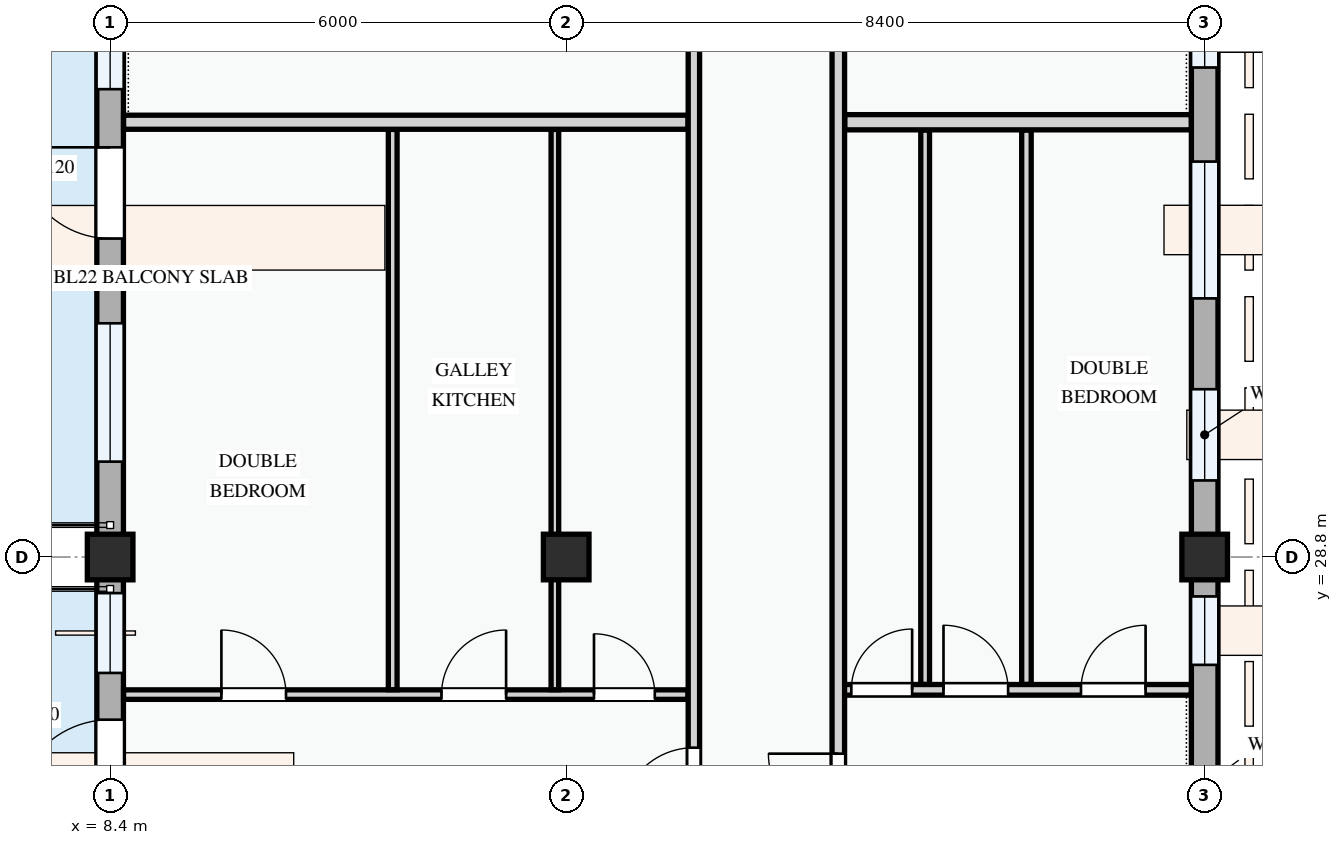
"""IFC4 building model, lengths in metres.
Left out: names, types, materials, properties, quantities, classifications, styles, units other than length and angle.
Written with IfcOpenShell. Run it as: python <this file> out.ifc"""

import sys

from ifc_helpers import new_model, si_unit, direction, frame, frame_2d, origin, origin_2d, place, context, subcontext, project, spatial, rectangle, extrude, element, fill, save


model = new_model("IFC4")
c1 = context("Model", 3, precision=1e-05, world=origin(), true_north=direction((0.0, 1.0)))
c2 = subcontext(c1, "Body", "Model", "MODEL_VIEW")
j1 = project(units=[si_unit("LENGTHUNIT", "METRE"), si_unit("PLANEANGLEUNIT", "RADIAN")], contexts=[c1])
p1 = place(None, origin())
s1 = spatial("IfcSite", under=j1, at=p1, CompositionType="ELEMENT")
p2 = place(p1, origin())
s2 = spatial("IfcBuilding", under=s1, at=p2, CompositionType="ELEMENT")
p3 = place(p2, frame((0.0, 0.0, 8.1)))
s3 = spatial("IfcBuildingStorey", under=s2, at=p3, CompositionType="ELEMENT", Elevation=8.1)
for number, where, z_axis, x_axis in (
    (1, (8.4, 28.8, 0.0), (0.0, 0.0, 1.0), (1.0, 0.0, 0.0)),
    (2, (14.4, 28.8, 0.0), (0.0, 0.0, 1.0), (1.0, 0.0, 0.0)),
    (3, (22.8, 28.8, 0.0), (0.0, 0.0, 1.0), (1.0, 0.0, 0.0)),
):
    element("IfcColumn", number, at=place(p3, frame(where, z_axis=z_axis, x_axis=x_axis)), inside=s3, PredefinedType="COLUMN", context=c2, shape_type="SweptSolid", body=[
        extrude(rectangle(XDim=0.6, YDim=0.6, at=origin_2d()), origin(), (0.0, 0.0, 1.0), 3.3),
    ])
p4 = place(p3, frame((22.8, 22.8, 0.0), z_axis=(0.0, 0.0, 1.0), x_axis=(0.0, 1.0, 0.0)))
e4 = element("IfcWall", 4, at=p4, inside=s3, PredefinedType="STANDARD", context=c2, shape_type="SweptSolid", body=[
    extrude(rectangle(XDim=6.0, YDim=0.35, at=frame_2d((3.0, 0.0))), origin(), (0.0, 0.0, 1.0), 2.575),
])
p5 = place(p4, frame((1.481, 0.0, 0.78)))
e5 = element("IfcOpeningElement", 5, at=p5, cuts=e4, PredefinedType="OPENING", context=c2, shape_type="SweptSolid", body=[
    extrude(rectangle(XDim=1.48, YDim=1.52, at=frame_2d((0.74, 0.76))), frame((0.0, 0.185, 0.0), z_axis=(0.0, -1.0, 0.0), x_axis=(1.0, 0.0, 0.0)), (0.0, 0.0, 1.0), 0.37),
])
p6 = place(p4, frame((4.581, 0.0, 0.78)))
e6 = element("IfcOpeningElement", 6, at=p6, cuts=e4, PredefinedType="OPENING", context=c2, shape_type="SweptSolid", body=[
    extrude(rectangle(XDim=0.9, YDim=1.2, at=frame_2d((0.45, 0.6))), frame((0.0, 0.185, 0.0), z_axis=(0.0, -1.0, 0.0), x_axis=(1.0, 0.0, 0.0)), (0.0, 0.0, 1.0), 0.37),
])
p7 = place(p3, frame((22.8, 28.8, 0.0), z_axis=(0.0, 0.0, 1.0), x_axis=(0.0, 1.0, 0.0)))
e7 = element("IfcWall", 7, at=p7, inside=s3, PredefinedType="STANDARD", context=c2, shape_type="SweptSolid", body=[
    extrude(rectangle(XDim=8.4, YDim=0.35, at=frame_2d((4.2, 0.0))), origin(), (0.0, 0.0, 1.0), 2.425),
])
p8 = place(p7, frame((1.008, 0.0, 0.78)))
e8 = element("IfcOpeningElement", 8, at=p8, cuts=e7, PredefinedType="OPENING", context=c2, shape_type="SweptSolid", body=[
    extrude(rectangle(XDim=1.2, YDim=1.5, at=frame_2d((0.6, 0.75))), frame((0.0, 0.185, 0.0), z_axis=(0.0, -1.0, 0.0), x_axis=(1.0, 0.0, 0.0)), (0.0, 0.0, 1.0), 0.37),
])
p9 = place(p7, frame((3.403, 0.0, 0.78)))
e9 = element("IfcOpeningElement", 9, at=p9, cuts=e7, PredefinedType="OPENING", context=c2, shape_type="SweptSolid", body=[
    extrude(rectangle(XDim=1.8, YDim=1.5, at=frame_2d((0.9, 0.75))), frame((0.0, 0.185, 0.0), z_axis=(0.0, -1.0, 0.0), x_axis=(1.0, 0.0, 0.0)), (0.0, 0.0, 1.0), 0.37),
])
p10 = place(p7, frame((6.44, 0.0, 0.78)))
e10 = element("IfcOpeningElement", 10, at=p10, cuts=e7, PredefinedType="OPENING", context=c2, shape_type="SweptSolid", body=[
    extrude(rectangle(XDim=1.05, YDim=1.2, at=frame_2d((0.525, 0.6))), frame((0.0, 0.185, 0.0), z_axis=(0.0, -1.0, 0.0), x_axis=(1.0, 0.0, 0.0)), (0.0, 0.0, 1.0), 0.37),
])
p11 = place(p3, frame((8.4, 37.2, 0.0), z_axis=(0.0, 0.0, 1.0), x_axis=(0.0, -1.0, 0.0)))
e11 = element("IfcWall", 11, at=p11, inside=s3, PredefinedType="STANDARD", context=c2, shape_type="SweptSolid", body=[
    extrude(rectangle(XDim=8.4, YDim=0.35, at=frame_2d((4.2, 0.0))), origin(), (0.0, 0.0, 1.0), 2.345),
])
p12 = place(p11, frame((3.01, 0.0, 0.0)))
e12 = element("IfcOpeningElement", 12, at=p12, cuts=e11, PredefinedType="OPENING", context=c2, shape_type="SweptSolid", body=[
    extrude(rectangle(XDim=1.2, YDim=2.15, at=frame_2d((0.6, 1.075))), frame((0.0, 0.185, 0.0), z_axis=(0.0, -1.0, 0.0), x_axis=(1.0, 0.0, 0.0)), (0.0, 0.0, 1.0), 0.37),
])
p13 = place(p11, frame((0.625, 0.0, 0.78)))
e13 = element("IfcOpeningElement", 13, at=p13, cuts=e11, PredefinedType="OPENING", context=c2, shape_type="SweptSolid", body=[
    extrude(rectangle(XDim=1.62, YDim=1.38, at=frame_2d((0.81, 0.69))), frame((0.0, 0.185, 0.0), z_axis=(0.0, -1.0, 0.0), x_axis=(1.0, 0.0, 0.0)), (0.0, 0.0, 1.0), 0.37),
])
p14 = place(p11, frame((5.325, 0.0, 0.78)))
e14 = element("IfcOpeningElement", 14, at=p14, cuts=e11, PredefinedType="OPENING", context=c2, shape_type="SweptSolid", body=[
    extrude(rectangle(XDim=1.82, YDim=1.46, at=frame_2d((0.91, 0.73))), frame((0.0, 0.185, 0.0), z_axis=(0.0, -1.0, 0.0), x_axis=(1.0, 0.0, 0.0)), (0.0, 0.0, 1.0), 0.37),
])
p15 = place(p3, frame((8.4, 28.8, 0.0), z_axis=(0.0, 0.0, 1.0), x_axis=(0.0, -1.0, 0.0)))
e15 = element("IfcWall", 15, at=p15, inside=s3, PredefinedType="STANDARD", context=c2, shape_type="SweptSolid", body=[
    extrude(rectangle(XDim=6.0, YDim=0.35, at=frame_2d((3.0, 0.0))), origin(), (0.0, 0.0, 1.0), 2.445),
])
p16 = place(p15, frame((2.14, 0.0, 0.0)))
e16 = element("IfcOpeningElement", 16, at=p16, cuts=e15, PredefinedType="OPENING", context=c2, shape_type="SweptSolid", body=[
    extrude(rectangle(XDim=1.25, YDim=2.2, at=frame_2d((0.625, 1.1))), frame((0.0, 0.185, 0.0), z_axis=(0.0, -1.0, 0.0), x_axis=(1.0, 0.0, 0.0)), (0.0, 0.0, 1.0), 0.37),
])
p17 = place(p15, frame((0.475, 0.0, 0.78)))
e17 = element("IfcOpeningElement", 17, at=p17, cuts=e15, PredefinedType="OPENING", context=c2, shape_type="SweptSolid", body=[
    extrude(rectangle(XDim=1.05, YDim=1.2, at=frame_2d((0.525, 0.6))), frame((0.0, 0.185, 0.0), z_axis=(0.0, -1.0, 0.0), x_axis=(1.0, 0.0, 0.0)), (0.0, 0.0, 1.0), 0.37),
])
p18 = place(p15, frame((3.815, 0.0, 0.78)))
e18 = element("IfcOpeningElement", 18, at=p18, cuts=e15, PredefinedType="OPENING", context=c2, shape_type="SweptSolid", body=[
    extrude(rectangle(XDim=1.62, YDim=1.38, at=frame_2d((0.81, 0.69))), frame((0.0, 0.185, 0.0), z_axis=(0.0, -1.0, 0.0), x_axis=(1.0, 0.0, 0.0)), (0.0, 0.0, 1.0), 0.37),
])
p19 = place(p3, frame((8.577, 26.99, 0.0), z_axis=(0.0, 0.0, 1.0), x_axis=(1.0, 0.0, 0.0)))
e19 = element("IfcWall", 19, at=p19, inside=s3, PredefinedType="PARTITIONING", context=c2, shape_type="SweptSolid", body=[
    extrude(rectangle(XDim=7.426, YDim=0.125, at=frame_2d((3.713, 0.0))), origin(), (0.0, 0.0, 1.0), 3.0),
])
p20 = place(p19, frame((1.287, 0.0, 0.0)))
e20 = element("IfcOpeningElement", 20, at=p20, cuts=e19, PredefinedType="OPENING", context=c2, shape_type="SweptSolid", body=[
    extrude(rectangle(XDim=0.85, YDim=2.1, at=frame_2d((0.425, 1.05))), frame((0.0, 0.073, 0.0), z_axis=(0.0, -1.0, 0.0), x_axis=(1.0, 0.0, 0.0)), (0.0, 0.0, 1.0), 0.145),
])
p21 = place(p19, frame((4.182, 0.0, 0.0)))
e21 = element("IfcOpeningElement", 21, at=p21, cuts=e19, PredefinedType="OPENING", context=c2, shape_type="SweptSolid", body=[
    extrude(rectangle(XDim=0.85, YDim=2.1, at=frame_2d((0.425, 1.05))), frame((0.0, 0.073, 0.0), z_axis=(0.0, -1.0, 0.0), x_axis=(1.0, 0.0, 0.0)), (0.0, 0.0, 1.0), 0.145),
])
p22 = place(p19, frame((6.189, 0.0, 0.0)))
e22 = element("IfcOpeningElement", 22, at=p22, cuts=e19, PredefinedType="OPENING", context=c2, shape_type="SweptSolid", body=[
    extrude(rectangle(XDim=0.8, YDim=2.1, at=frame_2d((0.4, 1.05))), frame((0.0, 0.073, 0.0), z_axis=(0.0, -1.0, 0.0), x_axis=(1.0, 0.0, 0.0)), (0.0, 0.0, 1.0), 0.145),
])
p23 = place(p3, frame((12.118, 27.054, 0.0), z_axis=(0.0, 0.0, 1.0), x_axis=(0.0, 1.0, 0.0)))
e23 = element("IfcWall", 23, at=p23, inside=s3, PredefinedType="PARTITIONING", context=c2, shape_type="SweptSolid", body=[
    extrude(rectangle(XDim=7.371, YDim=0.115, at=frame_2d((3.686, 0.0))), origin(), (0.0, 0.0, 1.0), 3.0),
])
p24 = place(p3, frame((14.251, 27.054, 0.0), z_axis=(0.0, 0.0, 1.0), x_axis=(0.0, 1.0, 0.0)))
e24 = element("IfcWall", 24, at=p24, inside=s3, PredefinedType="PARTITIONING", context=c2, shape_type="SweptSolid", body=[
    extrude(rectangle(XDim=7.371, YDim=0.1, at=frame_2d((3.686, 0.0))), origin(), (0.0, 0.0, 1.0), 2.425),
])
p25 = place(p3, frame((17.98, 27.053, 0.0), z_axis=(0.0, 0.0, 1.0), x_axis=(1.0, 0.0, 0.0)))
e25 = element("IfcWall", 25, at=p25, inside=s3, PredefinedType="PARTITIONING", context=c2, shape_type="SweptSolid", body=[
    extrude(rectangle(XDim=4.643, YDim=0.14, at=frame_2d((2.322, 0.0))), origin(), (0.0, 0.0, 1.0), 3.0),
])
p26 = place(p25, frame((0.171, 0.0, 0.0)))
e26 = element("IfcOpeningElement", 26, at=p26, cuts=e25, PredefinedType="OPENING", context=c2, shape_type="SweptSolid", body=[
    extrude(rectangle(XDim=0.8, YDim=2.1, at=frame_2d((0.4, 1.05))), frame((0.0, 0.08, 0.0), z_axis=(0.0, -1.0, 0.0), x_axis=(1.0, 0.0, 0.0)), (0.0, 0.0, 1.0), 0.16),
])
p27 = place(p25, frame((1.384, 0.0, 0.0)))
e27 = element("IfcOpeningElement", 27, at=p27, cuts=e25, PredefinedType="OPENING", context=c2, shape_type="SweptSolid", body=[
    extrude(rectangle(XDim=0.85, YDim=2.1, at=frame_2d((0.425, 1.05))), frame((0.0, 0.08, 0.0), z_axis=(0.0, -1.0, 0.0), x_axis=(1.0, 0.0, 0.0)), (0.0, 0.0, 1.0), 0.16),
])
p28 = place(p25, frame((3.193, 0.0, 0.0)))
e28 = element("IfcOpeningElement", 28, at=p28, cuts=e25, PredefinedType="OPENING", context=c2, shape_type="SweptSolid", body=[
    extrude(rectangle(XDim=0.85, YDim=2.1, at=frame_2d((0.425, 1.05))), frame((0.0, 0.08, 0.0), z_axis=(0.0, -1.0, 0.0), x_axis=(1.0, 0.0, 0.0)), (0.0, 0.0, 1.0), 0.16),
])
p29 = place(p3, frame((20.455, 27.125, 0.0), z_axis=(0.0, 0.0, 1.0), x_axis=(0.0, 1.0, 0.0)))
e29 = element("IfcWall", 29, at=p29, inside=s3, PredefinedType="PARTITIONING", context=c2, shape_type="SweptSolid", body=[
    extrude(rectangle(XDim=7.293, YDim=0.125, at=frame_2d((3.646, 0.0))), origin(), (0.0, 0.0, 1.0), 3.0),
])
p30 = place(p3, frame((19.122, 27.125, 0.0), z_axis=(0.0, 0.0, 1.0), x_axis=(0.0, 1.0, 0.0)))
e30 = element("IfcWall", 30, at=p30, inside=s3, PredefinedType="PARTITIONING", context=c2, shape_type="SweptSolid", body=[
    extrude(rectangle(XDim=7.293, YDim=0.115, at=frame_2d((3.646, 0.0))), origin(), (0.0, 0.0, 1.0), 3.0),
])
p31 = place(p3, frame((8.577, 34.52, 0.0), z_axis=(0.0, 0.0, 1.0), x_axis=(1.0, 0.0, 0.0)))
e31 = element("IfcWall", 31, at=p31, inside=s3, PredefinedType="PARTITIONING", context=c2, shape_type="SweptSolid", body=[
    extrude(rectangle(XDim=7.426, YDim=0.185, at=frame_2d((3.713, 0.0))), origin(), (0.0, 0.0, 1.0), 3.0),
])
p32 = place(p3, frame((18.064, 34.52, 0.0), z_axis=(0.0, 0.0, 1.0), x_axis=(1.0, 0.0, 0.0)))
e32 = element("IfcWall", 32, at=p32, inside=s3, PredefinedType="PARTITIONING", context=c2, shape_type="SweptSolid", body=[
    extrude(rectangle(XDim=4.559, YDim=0.2, at=frame_2d((2.279, 0.0))), origin(), (0.0, 0.0, 1.0), 3.0),
])
p33 = place(p3, frame((16.08, 22.66, 0.0), z_axis=(0.0, 0.0, 1.0), x_axis=(0.0, 1.0, 0.0)))
e33 = element("IfcWall", 33, at=p33, inside=s3, PredefinedType="PARTITIONING", context=c2, shape_type="SweptSolid", body=[
    extrude(rectangle(XDim=34.763, YDim=0.15, at=frame_2d((17.382, 0.0))), origin(), (0.0, 0.0, 1.0), 3.0),
])
p34 = place(p33, frame((2.672, 0.0, 0.0)))
e34 = element("IfcOpeningElement", 34, at=p34, cuts=e33, PredefinedType="OPENING", context=c2, shape_type="SweptSolid", body=[
    extrude(rectangle(XDim=0.96, YDim=2.12, at=frame_2d((0.48, 1.06))), frame((0.0, 0.085, 0.0), z_axis=(0.0, -1.0, 0.0), x_axis=(1.0, 0.0, 0.0)), (0.0, 0.0, 1.0), 0.17),
])
p35 = place(p33, frame((16.58, 0.0, 0.0)))
e35 = element("IfcOpeningElement", 35, at=p35, cuts=e33, PredefinedType="OPENING", context=c2, shape_type="SweptSolid", body=[
    extrude(rectangle(XDim=0.92, YDim=2.1, at=frame_2d((0.46, 1.05))), frame((0.0, 0.085, 0.0), z_axis=(0.0, -1.0, 0.0), x_axis=(1.0, 0.0, 0.0)), (0.0, 0.0, 1.0), 0.17),
])
p36 = place(p33, frame((24.315, 0.0, 0.0)))
e36 = element("IfcOpeningElement", 36, at=p36, cuts=e33, PredefinedType="OPENING", context=c2, shape_type="SweptSolid", body=[
    extrude(rectangle(XDim=0.92, YDim=2.1, at=frame_2d((0.46, 1.05))), frame((0.0, 0.085, 0.0), z_axis=(0.0, -1.0, 0.0), x_axis=(1.0, 0.0, 0.0)), (0.0, 0.0, 1.0), 0.17),
])
p37 = place(p3, frame((17.98, 22.66, 0.0), z_axis=(0.0, 0.0, 1.0), x_axis=(0.0, 1.0, 0.0)))
e37 = element("IfcWall", 37, at=p37, inside=s3, PredefinedType="PARTITIONING", context=c2, shape_type="SweptSolid", body=[
    extrude(rectangle(XDim=34.763, YDim=0.165, at=frame_2d((17.382, 0.0))), origin(), (0.0, 0.0, 1.0), 3.0),
])
p38 = place(p37, frame((2.633, 0.0, 0.0)))
e38 = element("IfcOpeningElement", 38, at=p38, cuts=e37, PredefinedType="OPENING", context=c2, shape_type="SweptSolid", body=[
    extrude(rectangle(XDim=0.92, YDim=2.1, at=frame_2d((0.46, 1.05))), frame((0.0, 0.093, 0.0), z_axis=(0.0, -1.0, 0.0), x_axis=(1.0, 0.0, 0.0)), (0.0, 0.0, 1.0), 0.185),
])
p39 = place(p37, frame((16.343, 0.0, 0.0)))
e39 = element("IfcOpeningElement", 39, at=p39, cuts=e37, PredefinedType="OPENING", context=c2, shape_type="SweptSolid", body=[
    extrude(rectangle(XDim=0.92, YDim=2.1, at=frame_2d((0.46, 1.05))), frame((0.0, 0.093, 0.0), z_axis=(0.0, -1.0, 0.0), x_axis=(1.0, 0.0, 0.0)), (0.0, 0.0, 1.0), 0.185),
])
p40 = place(p37, frame((24.313, 0.0, 0.0)))
e40 = element("IfcOpeningElement", 40, at=p40, cuts=e37, PredefinedType="OPENING", context=c2, shape_type="SweptSolid", body=[
    extrude(rectangle(XDim=0.96, YDim=2.12, at=frame_2d((0.48, 1.06))), frame((0.0, 0.093, 0.0), z_axis=(0.0, -1.0, 0.0), x_axis=(1.0, 0.0, 0.0)), (0.0, 0.0, 1.0), 0.185),
])
p41 = place(p6, origin())
e41 = element("IfcWindow", 41, at=p41, inside=s3, PartitioningType="SINGLE_PANEL", PredefinedType="WINDOW", context=c2, shape_type="SweptSolid", body=[
    extrude(rectangle(XDim=0.9, YDim=1.2, at=frame_2d((0.45, 0.6))), frame((0.0, 0.03, 0.0), z_axis=(0.0, -1.0, 0.0), x_axis=(1.0, 0.0, 0.0)), (0.0, 0.0, 1.0), 0.06),
])
fill(e6, e41)
p42 = place(p8, origin())
e42 = element("IfcWindow", 42, at=p42, inside=s3, PartitioningType="SINGLE_PANEL", PredefinedType="WINDOW", context=c2, shape_type="SweptSolid", body=[
    extrude(rectangle(XDim=1.2, YDim=1.5, at=frame_2d((0.6, 0.75))), frame((0.0, 0.03, 0.0), z_axis=(0.0, -1.0, 0.0), x_axis=(1.0, 0.0, 0.0)), (0.0, 0.0, 1.0), 0.06),
])
fill(e8, e42)
p43 = place(p9, origin())
e43 = element("IfcWindow", 43, at=p43, inside=s3, PartitioningType="DOUBLE_PANEL_VERTICAL", PredefinedType="WINDOW", context=c2, shape_type="SweptSolid", body=[
    extrude(rectangle(XDim=1.8, YDim=1.5, at=frame_2d((0.9, 0.75))), frame((0.0, 0.03, 0.0), z_axis=(0.0, -1.0, 0.0), x_axis=(1.0, 0.0, 0.0)), (0.0, 0.0, 1.0), 0.06),
])
fill(e9, e43)
p44 = place(p10, origin())
e44 = element("IfcWindow", 44, at=p44, inside=s3, PartitioningType="SINGLE_PANEL", PredefinedType="WINDOW", context=c2, shape_type="SweptSolid", body=[
    extrude(rectangle(XDim=1.05, YDim=1.2, at=frame_2d((0.525, 0.6))), frame((0.0, 0.03, 0.0), z_axis=(0.0, -1.0, 0.0), x_axis=(1.0, 0.0, 0.0)), (0.0, 0.0, 1.0), 0.06),
])
fill(e10, e44)
p45 = place(p12, frame((1.2, 0.0, 0.0), z_axis=(0.0, 0.0, 1.0), x_axis=(-1.0, 0.0, 0.0)))
e45 = element("IfcDoor", 45, at=p45, inside=s3, OperationType="SINGLE_SWING_RIGHT", PredefinedType="DOOR", context=c2, shape_type="SweptSolid", body=[
    extrude(rectangle(XDim=1.2, YDim=2.15, at=frame_2d((0.6, 1.075))), frame((0.0, 0.025, 0.0), z_axis=(0.0, -1.0, 0.0), x_axis=(1.0, 0.0, 0.0)), (0.0, 0.0, 1.0), 0.05),
])
fill(e12, e45)
p46 = place(p13, origin())
e46 = element("IfcWindow", 46, at=p46, inside=s3, PartitioningType="DOUBLE_PANEL_VERTICAL", PredefinedType="WINDOW", context=c2, shape_type="SweptSolid", body=[
    extrude(rectangle(XDim=1.62, YDim=1.38, at=frame_2d((0.81, 0.69))), frame((0.0, 0.03, 0.0), z_axis=(0.0, -1.0, 0.0), x_axis=(1.0, 0.0, 0.0)), (0.0, 0.0, 1.0), 0.06),
])
fill(e13, e46)
p47 = place(p14, origin())
e47 = element("IfcWindow", 47, at=p47, inside=s3, PartitioningType="DOUBLE_PANEL_VERTICAL", PredefinedType="WINDOW", context=c2, shape_type="SweptSolid", body=[
    extrude(rectangle(XDim=1.82, YDim=1.46, at=frame_2d((0.91, 0.73))), frame((0.0, 0.03, 0.0), z_axis=(0.0, -1.0, 0.0), x_axis=(1.0, 0.0, 0.0)), (0.0, 0.0, 1.0), 0.06),
])
fill(e14, e47)
p48 = place(p16, frame((1.25, 0.0, 0.0), z_axis=(0.0, 0.0, 1.0), x_axis=(-1.0, 0.0, 0.0)))
e48 = element("IfcDoor", 48, at=p48, inside=s3, OperationType="SINGLE_SWING_LEFT", PredefinedType="DOOR", context=c2, shape_type="SweptSolid", body=[
    extrude(rectangle(XDim=1.25, YDim=2.2, at=frame_2d((0.625, 1.1))), frame((0.0, 0.025, 0.0), z_axis=(0.0, -1.0, 0.0), x_axis=(1.0, 0.0, 0.0)), (0.0, 0.0, 1.0), 0.05),
])
fill(e16, e48)
p49 = place(p17, origin())
e49 = element("IfcWindow", 49, at=p49, inside=s3, PartitioningType="SINGLE_PANEL", PredefinedType="WINDOW", context=c2, shape_type="SweptSolid", body=[
    extrude(rectangle(XDim=1.05, YDim=1.2, at=frame_2d((0.525, 0.6))), frame((0.0, 0.03, 0.0), z_axis=(0.0, -1.0, 0.0), x_axis=(1.0, 0.0, 0.0)), (0.0, 0.0, 1.0), 0.06),
])
fill(e17, e49)
p50 = place(p20, origin())
e50 = element("IfcDoor", 50, at=p50, inside=s3, OperationType="SINGLE_SWING_LEFT", PredefinedType="DOOR", context=c2, shape_type="SweptSolid", body=[
    extrude(rectangle(XDim=0.85, YDim=2.1, at=frame_2d((0.425, 1.05))), frame((0.0, 0.025, 0.0), z_axis=(0.0, -1.0, 0.0), x_axis=(1.0, 0.0, 0.0)), (0.0, 0.0, 1.0), 0.05),
])
fill(e20, e50)
p51 = place(p21, origin())
e51 = element("IfcDoor", 51, at=p51, inside=s3, OperationType="SINGLE_SWING_RIGHT", PredefinedType="DOOR", context=c2, shape_type="SweptSolid", body=[
    extrude(rectangle(XDim=0.85, YDim=2.1, at=frame_2d((0.425, 1.05))), frame((0.0, 0.025, 0.0), z_axis=(0.0, -1.0, 0.0), x_axis=(1.0, 0.0, 0.0)), (0.0, 0.0, 1.0), 0.05),
])
fill(e21, e51)
p52 = place(p22, origin())
e52 = element("IfcDoor", 52, at=p52, inside=s3, OperationType="SINGLE_SWING_LEFT", PredefinedType="DOOR", context=c2, shape_type="SweptSolid", body=[
    extrude(rectangle(XDim=0.8, YDim=2.1, at=frame_2d((0.4, 1.05))), frame((0.0, 0.025, 0.0), z_axis=(0.0, -1.0, 0.0), x_axis=(1.0, 0.0, 0.0)), (0.0, 0.0, 1.0), 0.05),
])
fill(e22, e52)
p53 = place(p26, origin())
e53 = element("IfcDoor", 53, at=p53, inside=s3, OperationType="SINGLE_SWING_RIGHT", PredefinedType="DOOR", context=c2, shape_type="SweptSolid", body=[
    extrude(rectangle(XDim=0.8, YDim=2.1, at=frame_2d((0.4, 1.05))), frame((0.0, 0.025, 0.0), z_axis=(0.0, -1.0, 0.0), x_axis=(1.0, 0.0, 0.0)), (0.0, 0.0, 1.0), 0.05),
])
fill(e26, e53)
p54 = place(p27, origin())
e54 = element("IfcDoor", 54, at=p54, inside=s3, OperationType="SINGLE_SWING_LEFT", PredefinedType="DOOR", context=c2, shape_type="SweptSolid", body=[
    extrude(rectangle(XDim=0.85, YDim=2.1, at=frame_2d((0.425, 1.05))), frame((0.0, 0.025, 0.0), z_axis=(0.0, -1.0, 0.0), x_axis=(1.0, 0.0, 0.0)), (0.0, 0.0, 1.0), 0.05),
])
fill(e27, e54)
p55 = place(p28, origin())
e55 = element("IfcDoor", 55, at=p55, inside=s3, OperationType="SINGLE_SWING_RIGHT", PredefinedType="DOOR", context=c2, shape_type="SweptSolid", body=[
    extrude(rectangle(XDim=0.85, YDim=2.1, at=frame_2d((0.425, 1.05))), frame((0.0, 0.025, 0.0), z_axis=(0.0, -1.0, 0.0), x_axis=(1.0, 0.0, 0.0)), (0.0, 0.0, 1.0), 0.05),
])
fill(e28, e55)
p56 = place(p34, origin())
e56 = element("IfcDoor", 56, at=p56, inside=s3, OperationType="SINGLE_SWING_LEFT", PredefinedType="DOOR", context=c2, shape_type="SweptSolid", body=[
    extrude(rectangle(XDim=0.96, YDim=2.12, at=frame_2d((0.48, 1.06))), frame((0.0, 0.025, 0.0), z_axis=(0.0, -1.0, 0.0), x_axis=(1.0, 0.0, 0.0)), (0.0, 0.0, 1.0), 0.05),
])
fill(e34, e56)
p57 = place(p38, origin())
e57 = element("IfcDoor", 57, at=p57, inside=s3, OperationType="SINGLE_SWING_RIGHT", PredefinedType="DOOR", context=c2, shape_type="SweptSolid", body=[
    extrude(rectangle(XDim=0.92, YDim=2.1, at=frame_2d((0.46, 1.05))), frame((0.0, 0.025, 0.0), z_axis=(0.0, -1.0, 0.0), x_axis=(1.0, 0.0, 0.0)), (0.0, 0.0, 1.0), 0.05),
])
fill(e38, e57)
save(model, sys.argv[1])
